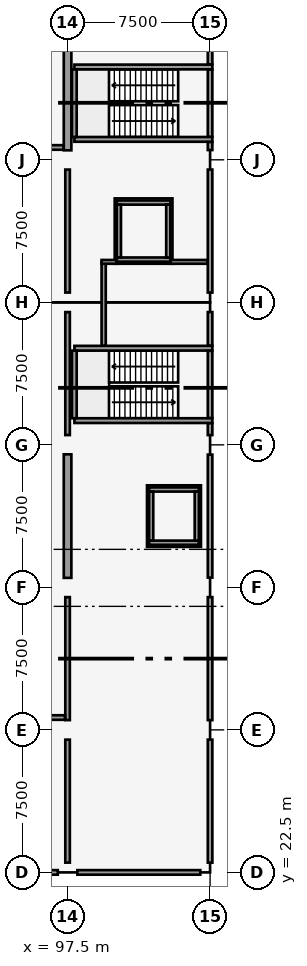
"""IFC4 building model, lengths in metres.
Left out: names, types, materials, properties, quantities, classifications, styles, units other than length and angle.
Written with IfcOpenShell. Run it as: python <this file> out.ifc"""

import sys

from ifc_helpers import new_model, si_unit, direction, frame, frame_2d, origin, origin_2d, place, context, subcontext, project, spatial, rectangle, extrude, element, fill, save


model = new_model("IFC4")
c1 = context("Model", 3, precision=1e-05, world=origin(), true_north=direction((0.0, 1.0)))
c2 = subcontext(c1, "Body", "Model", "MODEL_VIEW")
j1 = project(units=[si_unit("LENGTHUNIT", "METRE"), si_unit("PLANEANGLEUNIT", "RADIAN")], contexts=[c1])
p1 = place(None, origin())
s1 = spatial("IfcSite", under=j1, at=p1, CompositionType="ELEMENT")
p2 = place(p1, origin())
s2 = spatial("IfcBuilding", under=s1, at=p2, CompositionType="ELEMENT")
p3 = place(p2, frame((0.0, 0.0, -4.8)))
s3 = spatial("IfcBuildingStorey", under=s2, at=p3, CompositionType="ELEMENT", Elevation=-4.8)
for number, where, z_axis, x_axis in (
    (1, (97.5, 22.5, 0.0), (0.0, 0.0, 1.0), (1.0, 0.0, 0.0)),
    (2, (97.5, 30.0, 0.0), (0.0, 0.0, 1.0), (1.0, 0.0, 0.0)),
    (3, (97.5, 37.5, 0.0), (0.0, 0.0, 1.0), (1.0, 0.0, 0.0)),
    (4, (97.5, 45.0, 0.0), (0.0, 0.0, 1.0), (1.0, 0.0, 0.0)),
    (5, (97.5, 52.5, 0.0), (0.0, 0.0, 1.0), (1.0, 0.0, 0.0)),
    (6, (97.5, 60.0, 0.0), (0.0, 0.0, 1.0), (1.0, 0.0, 0.0)),
    (7, (105.0, 22.5, 0.0), (0.0, 0.0, 1.0), (1.0, 0.0, 0.0)),
    (8, (105.0, 30.0, 0.0), (0.0, 0.0, 1.0), (1.0, 0.0, 0.0)),
    (9, (105.0, 37.5, 0.0), (0.0, 0.0, 1.0), (1.0, 0.0, 0.0)),
    (10, (105.0, 45.0, 0.0), (0.0, 0.0, 1.0), (1.0, 0.0, 0.0)),
    (11, (105.0, 52.5, 0.0), (0.0, 0.0, 1.0), (1.0, 0.0, 0.0)),
    (12, (105.0, 60.0, 0.0), (0.0, 0.0, 1.0), (1.0, 0.0, 0.0)),
):
    element("IfcColumn", number, at=place(p3, frame(where, z_axis=z_axis, x_axis=x_axis)), inside=s3, PredefinedType="COLUMN", context=c2, shape_type="SweptSolid", body=[
        extrude(rectangle(XDim=1.0, YDim=1.0, at=origin_2d()), origin(), (0.0, 0.0, 1.0), 4.8),
    ])
for number, where, z_axis, x_axis in (
    (13, (97.5, 38.0, 0.0), (0.0, 0.0, 1.0), (0.0, 1.0, 0.0)),
    (14, (97.5, 60.5, 0.0), (0.0, 0.0, 1.0), (0.0, 1.0, 0.0)),
):
    element("IfcWall", number, at=place(p3, frame(where, z_axis=z_axis, x_axis=x_axis)), inside=s3, PredefinedType="SHEAR", context=c2, shape_type="SweptSolid", body=[
        extrude(rectangle(XDim=6.5, YDim=0.4, at=frame_2d((3.25, 0.0))), origin(), (0.0, 0.0, 1.0), 3.55),
    ])
p4 = place(p3, frame((97.86, 46.275, 0.0), z_axis=(0.0, 0.0, 1.0), x_axis=(1.0, 0.0, 0.0)))
e15 = element("IfcWall", 15, at=p4, inside=s3, PredefinedType="SOLIDWALL", context=c2, shape_type="SweptSolid", body=[
    extrude(rectangle(XDim=7.26, YDim=0.25, at=frame_2d((3.63, 0.0))), origin(), (0.0, 0.0, 1.0), 4.5),
])
p5 = place(p4, frame((5.54, 0.0, 0.0)))
e16 = element("IfcOpeningElement", 16, at=p5, cuts=e15, PredefinedType="OPENING", context=c2, shape_type="SweptSolid", body=[
    extrude(rectangle(XDim=1.1, YDim=2.15, at=frame_2d((0.55, 1.075))), frame((0.0, 0.135, 0.0), z_axis=(0.0, -1.0, 0.0), x_axis=(1.0, 0.0, 0.0)), (0.0, 0.0, 1.0), 0.27),
])
p6 = place(p3, frame((97.86, 50.085, 0.0), z_axis=(0.0, 0.0, 1.0), x_axis=(1.0, 0.0, 0.0)))
e17 = element("IfcWall", 17, at=p6, inside=s3, PredefinedType="SOLIDWALL", context=c2, shape_type="SweptSolid", body=[
    extrude(rectangle(XDim=7.26, YDim=0.25, at=frame_2d((3.63, 0.0))), origin(), (0.0, 0.0, 1.0), 4.5),
])
p7 = place(p6, frame((5.54, 0.0, 0.0)))
e18 = element("IfcOpeningElement", 18, at=p7, cuts=e17, PredefinedType="OPENING", context=c2, shape_type="SweptSolid", body=[
    extrude(rectangle(XDim=1.1, YDim=2.15, at=frame_2d((0.55, 1.075))), frame((0.0, 0.135, 0.0), z_axis=(0.0, -1.0, 0.0), x_axis=(1.0, 0.0, 0.0)), (0.0, 0.0, 1.0), 0.27),
])
p8 = place(p3, frame((97.855, 46.4, 0.0), z_axis=(0.0, 0.0, 1.0), x_axis=(0.0, 1.0, 0.0)))
e19 = element("IfcWall", 19, at=p8, inside=s3, PredefinedType="SOLIDWALL", context=c2, shape_type="SweptSolid", body=[
    extrude(rectangle(XDim=3.56, YDim=0.25, at=frame_2d((1.78, 0.0))), origin(), (0.0, 0.0, 1.0), 4.5),
])
p9 = place(p3, frame((97.86, 61.075, 0.0), z_axis=(0.0, 0.0, 1.0), x_axis=(1.0, 0.0, 0.0)))
e20 = element("IfcWall", 20, at=p9, inside=s3, PredefinedType="SOLIDWALL", context=c2, shape_type="SweptSolid", body=[
    extrude(rectangle(XDim=7.26, YDim=0.25, at=frame_2d((3.63, 0.0))), origin(), (0.0, 0.0, 1.0), 4.5),
])
p10 = place(p9, frame((5.54, 0.0, 0.0)))
e21 = element("IfcOpeningElement", 21, at=p10, cuts=e20, PredefinedType="OPENING", context=c2, shape_type="SweptSolid", body=[
    extrude(rectangle(XDim=1.1, YDim=2.15, at=frame_2d((0.55, 1.075))), frame((0.0, 0.135, 0.0), z_axis=(0.0, -1.0, 0.0), x_axis=(1.0, 0.0, 0.0)), (0.0, 0.0, 1.0), 0.27),
])
p11 = place(p3, frame((97.86, 64.885, 0.0), z_axis=(0.0, 0.0, 1.0), x_axis=(1.0, 0.0, 0.0)))
e22 = element("IfcWall", 22, at=p11, inside=s3, PredefinedType="SOLIDWALL", context=c2, shape_type="SweptSolid", body=[
    extrude(rectangle(XDim=7.26, YDim=0.25, at=frame_2d((3.63, 0.0))), origin(), (0.0, 0.0, 1.0), 4.5),
])
p12 = place(p11, frame((5.54, 0.0, 0.0)))
e23 = element("IfcOpeningElement", 23, at=p12, cuts=e22, PredefinedType="OPENING", context=c2, shape_type="SweptSolid", body=[
    extrude(rectangle(XDim=1.1, YDim=2.15, at=frame_2d((0.55, 1.075))), frame((0.0, 0.135, 0.0), z_axis=(0.0, -1.0, 0.0), x_axis=(1.0, 0.0, 0.0)), (0.0, 0.0, 1.0), 0.27),
])
p13 = place(p3, frame((97.855, 61.2, 0.0), z_axis=(0.0, 0.0, 1.0), x_axis=(0.0, 1.0, 0.0)))
e24 = element("IfcWall", 24, at=p13, inside=s3, PredefinedType="SOLIDWALL", context=c2, shape_type="SweptSolid", body=[
    extrude(rectangle(XDim=3.56, YDim=0.25, at=frame_2d((1.78, 0.0))), origin(), (0.0, 0.0, 1.0), 4.5),
])
for number, where, z_axis, x_axis in (
    (25, (101.79, 39.85, 0.0), (0.0, 0.0, 1.0), (1.0, 0.0, 0.0)),
    (26, (101.79, 42.65, 0.0), (0.0, 0.0, 1.0), (1.0, 0.0, 0.0)),
):
    element("IfcWall", number, at=place(p3, frame(where, z_axis=z_axis, x_axis=x_axis)), inside=s3, PredefinedType="SOLIDWALL", context=c2, shape_type="SweptSolid", body=[
        extrude(rectangle(XDim=2.62, YDim=0.22, at=frame_2d((1.31, 0.0))), origin(), (0.0, 0.0, 1.0), 4.5),
    ])
p14 = place(p3, frame((101.9, 39.96, 0.0), z_axis=(0.0, 0.0, 1.0), x_axis=(0.0, 1.0, 0.0)))
e27 = element("IfcWall", 27, at=p14, inside=s3, PredefinedType="SOLIDWALL", context=c2, shape_type="SweptSolid", body=[
    extrude(rectangle(XDim=2.58, YDim=0.22, at=frame_2d((1.29, 0.0))), origin(), (0.0, 0.0, 1.0), 4.5),
])
p15 = place(p14, frame((0.79, 0.0, 0.0)))
e28 = element("IfcOpeningElement", 28, at=p15, cuts=e27, PredefinedType="OPENING", context=c2, shape_type="SweptSolid", body=[
    extrude(rectangle(XDim=1.0, YDim=2.15, at=frame_2d((0.5, 1.075))), frame((0.0, 0.12, 0.0), z_axis=(0.0, -1.0, 0.0), x_axis=(1.0, 0.0, 0.0)), (0.0, 0.0, 1.0), 0.24),
])
p16 = place(p3, frame((104.3, 39.96, 0.0), z_axis=(0.0, 0.0, 1.0), x_axis=(0.0, 1.0, 0.0)))
e29 = element("IfcWall", 29, at=p16, inside=s3, PredefinedType="SOLIDWALL", context=c2, shape_type="SweptSolid", body=[
    extrude(rectangle(XDim=2.58, YDim=0.22, at=frame_2d((1.29, 0.0))), origin(), (0.0, 0.0, 1.0), 4.5),
])
p17 = place(p3, frame((100.09, 54.75, 0.0), z_axis=(0.0, 0.0, 1.0), x_axis=(1.0, 0.0, 0.0)))
e30 = element("IfcWall", 30, at=p17, inside=s3, PredefinedType="SOLIDWALL", context=c2, shape_type="SweptSolid", body=[
    extrude(rectangle(XDim=2.82, YDim=0.22, at=frame_2d((1.41, 0.0))), origin(), (0.0, 0.0, 1.0), 4.5),
])
p18 = place(p17, frame((0.86, 0.0, 0.0)))
e31 = element("IfcOpeningElement", 31, at=p18, cuts=e30, PredefinedType="OPENING", context=c2, shape_type="SweptSolid", body=[
    extrude(rectangle(XDim=1.1, YDim=2.15, at=frame_2d((0.55, 1.075))), frame((0.0, 0.12, 0.0), z_axis=(0.0, -1.0, 0.0), x_axis=(1.0, 0.0, 0.0)), (0.0, 0.0, 1.0), 0.24),
])
p19 = place(p3, frame((100.09, 57.75, 0.0), z_axis=(0.0, 0.0, 1.0), x_axis=(1.0, 0.0, 0.0)))
e32 = element("IfcWall", 32, at=p19, inside=s3, PredefinedType="SOLIDWALL", context=c2, shape_type="SweptSolid", body=[
    extrude(rectangle(XDim=2.82, YDim=0.22, at=frame_2d((1.41, 0.0))), origin(), (0.0, 0.0, 1.0), 4.5),
])
for number, where, z_axis, x_axis in (
    (33, (100.2, 54.86, 0.0), (0.0, 0.0, 1.0), (0.0, 1.0, 0.0)),
    (34, (102.8, 54.86, 0.0), (0.0, 0.0, 1.0), (0.0, 1.0, 0.0)),
):
    element("IfcWall", number, at=place(p3, frame(where, z_axis=z_axis, x_axis=x_axis)), inside=s3, PredefinedType="SOLIDWALL", context=c2, shape_type="SweptSolid", body=[
        extrude(rectangle(XDim=2.78, YDim=0.22, at=frame_2d((1.39, 0.0))), origin(), (0.0, 0.0, 1.0), 4.5),
    ])
p20 = place(p3, frame((99.4, 50.22, 0.0), z_axis=(0.0, 0.0, 1.0), x_axis=(0.0, 1.0, 0.0)))
e35 = element("IfcWall", 35, at=p20, inside=s3, PredefinedType="SOLIDWALL", context=c2, shape_type="SweptSolid", body=[
    extrude(rectangle(XDim=4.41, YDim=0.22, at=frame_2d((2.205, 0.0))), origin(), (0.0, 0.0, 1.0), 4.5),
])
p21 = place(p20, frame((0.45, 0.0, 0.0)))
e36 = element("IfcOpeningElement", 36, at=p21, cuts=e35, PredefinedType="OPENING", context=c2, shape_type="SweptSolid", body=[
    extrude(rectangle(XDim=1.1, YDim=2.15, at=frame_2d((0.55, 1.075))), frame((0.0, 0.12, 0.0), z_axis=(0.0, -1.0, 0.0), x_axis=(1.0, 0.0, 0.0)), (0.0, 0.0, 1.0), 0.24),
])
p22 = place(p3, frame((99.29, 54.63, 0.0), z_axis=(0.0, 0.0, 1.0), x_axis=(1.0, 0.0, 0.0)))
e37 = element("IfcWall", 37, at=p22, inside=s3, PredefinedType="PARTITIONING", context=c2, shape_type="SweptSolid", body=[
    extrude(rectangle(XDim=0.785, YDim=0.2, at=frame_2d((0.393, 0.0))), origin(), (0.0, 0.0, 1.0), 4.48),
])
p23 = place(p3, frame((102.925, 54.63, 0.0), z_axis=(0.0, 0.0, 1.0), x_axis=(1.0, 0.0, 0.0)))
e38 = element("IfcWall", 38, at=p23, inside=s3, PredefinedType="PARTITIONING", context=c2, shape_type="SweptSolid", body=[
    extrude(rectangle(XDim=1.935, YDim=0.2, at=frame_2d((0.968, 0.0))), origin(), (0.0, 0.0, 1.0), 4.48),
])
p24 = place(p3, frame((90.464, 22.5, 0.0), z_axis=(0.0, 0.0, 1.0), x_axis=(1.0, 0.0, 0.0)))
e39 = element("IfcWall", 39, at=p24, inside=s3, PredefinedType="PARTITIONING", context=c2, shape_type="SweptSolid", body=[
    extrude(rectangle(XDim=6.522, YDim=0.24, at=frame_2d((3.261, 0.0))), origin(), (0.0, 0.0, 1.0), 3.82),
])
p25 = place(p3, frame((98.014, 22.5, 0.0), z_axis=(0.0, 0.0, 1.0), x_axis=(1.0, 0.0, 0.0)))
e40 = element("IfcWall", 40, at=p25, inside=s3, PredefinedType="PARTITIONING", context=c2, shape_type="SweptSolid", body=[
    extrude(rectangle(XDim=6.472, YDim=0.24, at=frame_2d((3.236, 0.0))), origin(), (0.0, 0.0, 1.0), 3.82),
])
for number, where, z_axis, x_axis in (
    (41, (105.0, 23.014, 0.0), (0.0, 0.0, 1.0), (0.0, 1.0, 0.0)),
    (42, (105.0, 30.514, 0.0), (0.0, 0.0, 1.0), (0.0, 1.0, 0.0)),
    (43, (105.0, 38.014, 0.0), (0.0, 0.0, 1.0), (0.0, 1.0, 0.0)),
):
    element("IfcWall", number, at=place(p3, frame(where, z_axis=z_axis, x_axis=x_axis)), inside=s3, PredefinedType="PARTITIONING", context=c2, shape_type="SweptSolid", body=[
        extrude(rectangle(XDim=6.472, YDim=0.24, at=frame_2d((3.236, 0.0))), origin(), (0.0, 0.0, 1.0), 3.52),
    ])
p26 = place(p3, frame((105.0, 45.514, 0.0), z_axis=(0.0, 0.0, 1.0), x_axis=(0.0, 1.0, 0.0)))
e44 = element("IfcWall", 44, at=p26, inside=s3, PredefinedType="PARTITIONING", context=c2, shape_type="SweptSolid", body=[
    extrude(rectangle(XDim=0.622, YDim=0.24, at=frame_2d((0.311, 0.0))), origin(), (0.0, 0.0, 1.0), 3.52),
])
p27 = place(p3, frame((105.0, 46.414, 0.0), z_axis=(0.0, 0.0, 1.0), x_axis=(0.0, 1.0, 0.0)))
e45 = element("IfcWall", 45, at=p27, inside=s3, PredefinedType="PARTITIONING", context=c2, shape_type="SweptSolid", body=[
    extrude(rectangle(XDim=3.532, YDim=0.24, at=frame_2d((1.766, 0.0))), origin(), (0.0, 0.0, 1.0), 3.87),
])
p28 = place(p3, frame((105.0, 50.224, 0.0), z_axis=(0.0, 0.0, 1.0), x_axis=(0.0, 1.0, 0.0)))
e46 = element("IfcWall", 46, at=p28, inside=s3, PredefinedType="PARTITIONING", context=c2, shape_type="SweptSolid", body=[
    extrude(rectangle(XDim=1.762, YDim=0.24, at=frame_2d((0.881, 0.0))), origin(), (0.0, 0.0, 1.0), 3.52),
])
p29 = place(p3, frame((105.0, 53.014, 0.0), z_axis=(0.0, 0.0, 1.0), x_axis=(0.0, 1.0, 0.0)))
e47 = element("IfcWall", 47, at=p29, inside=s3, PredefinedType="PARTITIONING", context=c2, shape_type="SweptSolid", body=[
    extrude(rectangle(XDim=6.472, YDim=0.24, at=frame_2d((3.236, 0.0))), origin(), (0.0, 0.0, 1.0), 3.52),
])
p30 = place(p3, frame((105.0, 60.514, 0.0), z_axis=(0.0, 0.0, 1.0), x_axis=(0.0, 1.0, 0.0)))
e48 = element("IfcWall", 48, at=p30, inside=s3, PredefinedType="PARTITIONING", context=c2, shape_type="SweptSolid", body=[
    extrude(rectangle(XDim=0.422, YDim=0.24, at=frame_2d((0.211, 0.0))), origin(), (0.0, 0.0, 1.0), 3.52),
])
p31 = place(p3, frame((105.0, 61.214, 0.0), z_axis=(0.0, 0.0, 1.0), x_axis=(0.0, 1.0, 0.0)))
e49 = element("IfcWall", 49, at=p31, inside=s3, PredefinedType="PARTITIONING", context=c2, shape_type="SweptSolid", body=[
    extrude(rectangle(XDim=3.532, YDim=0.24, at=frame_2d((1.766, 0.0))), origin(), (0.0, 0.0, 1.0), 3.87),
])
p32 = place(p3, frame((105.0, 65.024, 0.0), z_axis=(0.0, 0.0, 1.0), x_axis=(0.0, 1.0, 0.0)))
e50 = element("IfcWall", 50, at=p32, inside=s3, PredefinedType="PARTITIONING", context=c2, shape_type="SweptSolid", body=[
    extrude(rectangle(XDim=1.962, YDim=0.24, at=frame_2d((0.981, 0.0))), origin(), (0.0, 0.0, 1.0), 3.52),
])
p33 = place(p3, frame((97.5, 23.014, 0.0), z_axis=(0.0, 0.0, 1.0), x_axis=(0.0, 1.0, 0.0)))
e51 = element("IfcWall", 51, at=p33, inside=s3, PredefinedType="PARTITIONING", context=c2, shape_type="SweptSolid", body=[
    extrude(rectangle(XDim=6.472, YDim=0.24, at=frame_2d((3.236, 0.0))), origin(), (0.0, 0.0, 1.0), 3.52),
])
p34 = place(p33, frame((2.436, 0.0, 0.0)))
e52 = element("IfcOpeningElement", 52, at=p34, cuts=e51, PredefinedType="OPENING", context=c2, shape_type="SweptSolid", body=[
    extrude(rectangle(XDim=1.6, YDim=2.15, at=frame_2d((0.8, 1.075))), frame((0.0, 0.13, 0.0), z_axis=(0.0, -1.0, 0.0), x_axis=(1.0, 0.0, 0.0)), (0.0, 0.0, 1.0), 0.26),
])
p35 = place(p3, frame((97.5, 30.514, 0.0), z_axis=(0.0, 0.0, 1.0), x_axis=(0.0, 1.0, 0.0)))
e53 = element("IfcWall", 53, at=p35, inside=s3, PredefinedType="PARTITIONING", context=c2, shape_type="SweptSolid", body=[
    extrude(rectangle(XDim=6.472, YDim=0.24, at=frame_2d((3.236, 0.0))), origin(), (0.0, 0.0, 1.0), 3.52),
])
p36 = place(p35, frame((2.436, 0.0, 0.0)))
e54 = element("IfcOpeningElement", 54, at=p36, cuts=e53, PredefinedType="OPENING", context=c2, shape_type="SweptSolid", body=[
    extrude(rectangle(XDim=1.6, YDim=2.15, at=frame_2d((0.8, 1.075))), frame((0.0, 0.13, 0.0), z_axis=(0.0, -1.0, 0.0), x_axis=(1.0, 0.0, 0.0)), (0.0, 0.0, 1.0), 0.26),
])
p37 = place(p3, frame((97.5, 45.514, 0.0), z_axis=(0.0, 0.0, 1.0), x_axis=(0.0, 1.0, 0.0)))
e55 = element("IfcWall", 55, at=p37, inside=s3, PredefinedType="PARTITIONING", context=c2, shape_type="SweptSolid", body=[
    extrude(rectangle(XDim=6.472, YDim=0.24, at=frame_2d((3.236, 0.0))), origin(), (0.0, 0.0, 1.0), 3.52),
])
p38 = place(p3, frame((97.5, 53.014, 0.0), z_axis=(0.0, 0.0, 1.0), x_axis=(0.0, 1.0, 0.0)))
e56 = element("IfcWall", 56, at=p38, inside=s3, PredefinedType="PARTITIONING", context=c2, shape_type="SweptSolid", body=[
    extrude(rectangle(XDim=6.472, YDim=0.24, at=frame_2d((3.236, 0.0))), origin(), (0.0, 0.0, 1.0), 3.52),
])
p39 = place(p38, frame((2.436, 0.0, 0.0)))
e57 = element("IfcOpeningElement", 57, at=p39, cuts=e56, PredefinedType="OPENING", context=c2, shape_type="SweptSolid", body=[
    extrude(rectangle(XDim=1.6, YDim=2.15, at=frame_2d((0.8, 1.075))), frame((0.0, 0.13, 0.0), z_axis=(0.0, -1.0, 0.0), x_axis=(1.0, 0.0, 0.0)), (0.0, 0.0, 1.0), 0.26),
])
p40 = place(p3, frame((60.134, 30.65, 0.0), z_axis=(0.0, 0.0, 1.0), x_axis=(1.0, 0.0, 0.0)))
e58 = element("IfcWall", 58, at=p40, inside=s3, PredefinedType="PARTITIONING", context=c2, shape_type="SweptSolid", body=[
    extrude(rectangle(XDim=37.232, YDim=0.24, at=frame_2d((18.616, 0.0))), origin(), (0.0, 0.0, 1.0), 3.42),
])
p41 = place(p3, frame((60.214, 60.65, 0.0), z_axis=(0.0, 0.0, 1.0), x_axis=(1.0, 0.0, 0.0)))
e59 = element("IfcWall", 59, at=p41, inside=s3, PredefinedType="PARTITIONING", context=c2, shape_type="SweptSolid", body=[
    extrude(rectangle(XDim=37.072, YDim=0.24, at=frame_2d((18.536, 0.0))), origin(), (0.0, 0.0, 1.0), 2.67),
])
p42 = place(p5, origin())
e60 = element("IfcDoor", 60, at=p42, inside=s3, OperationType="SINGLE_SWING_LEFT", PredefinedType="DOOR", context=c2, shape_type="SweptSolid", body=[
    extrude(rectangle(XDim=1.1, YDim=2.15, at=frame_2d((0.55, 1.075))), frame((0.0, 0.025, 0.0), z_axis=(0.0, -1.0, 0.0), x_axis=(1.0, 0.0, 0.0)), (0.0, 0.0, 1.0), 0.05),
])
fill(e16, e60)
p43 = place(p7, frame((1.1, 0.0, 0.0), z_axis=(0.0, 0.0, 1.0), x_axis=(-1.0, 0.0, 0.0)))
e61 = element("IfcDoor", 61, at=p43, inside=s3, OperationType="SINGLE_SWING_RIGHT", PredefinedType="DOOR", context=c2, shape_type="SweptSolid", body=[
    extrude(rectangle(XDim=1.1, YDim=2.15, at=frame_2d((0.55, 1.075))), frame((0.0, 0.025, 0.0), z_axis=(0.0, -1.0, 0.0), x_axis=(1.0, 0.0, 0.0)), (0.0, 0.0, 1.0), 0.05),
])
fill(e18, e61)
p44 = place(p10, origin())
e62 = element("IfcDoor", 62, at=p44, inside=s3, OperationType="SINGLE_SWING_LEFT", PredefinedType="DOOR", context=c2, shape_type="SweptSolid", body=[
    extrude(rectangle(XDim=1.1, YDim=2.15, at=frame_2d((0.55, 1.075))), frame((0.0, 0.025, 0.0), z_axis=(0.0, -1.0, 0.0), x_axis=(1.0, 0.0, 0.0)), (0.0, 0.0, 1.0), 0.05),
])
fill(e21, e62)
p45 = place(p12, frame((1.1, 0.0, 0.0), z_axis=(0.0, 0.0, 1.0), x_axis=(-1.0, 0.0, 0.0)))
e63 = element("IfcDoor", 63, at=p45, inside=s3, OperationType="SINGLE_SWING_RIGHT", PredefinedType="DOOR", context=c2, shape_type="SweptSolid", body=[
    extrude(rectangle(XDim=1.1, YDim=2.15, at=frame_2d((0.55, 1.075))), frame((0.0, 0.025, 0.0), z_axis=(0.0, -1.0, 0.0), x_axis=(1.0, 0.0, 0.0)), (0.0, 0.0, 1.0), 0.05),
])
fill(e23, e63)
p46 = place(p15, origin())
e64 = element("IfcDoor", 64, at=p46, inside=s3, OperationType="SLIDING_TO_LEFT", PredefinedType="DOOR", context=c2, shape_type="SweptSolid", body=[
    extrude(rectangle(XDim=1.0, YDim=2.15, at=frame_2d((0.5, 1.075))), frame((0.0, 0.025, 0.0), z_axis=(0.0, -1.0, 0.0), x_axis=(1.0, 0.0, 0.0)), (0.0, 0.0, 1.0), 0.05),
])
fill(e28, e64)
p47 = place(p18, origin())
e65 = element("IfcDoor", 65, at=p47, inside=s3, OperationType="SLIDING_TO_LEFT", PredefinedType="DOOR", context=c2, shape_type="SweptSolid", body=[
    extrude(rectangle(XDim=1.1, YDim=2.15, at=frame_2d((0.55, 1.075))), frame((0.0, 0.025, 0.0), z_axis=(0.0, -1.0, 0.0), x_axis=(1.0, 0.0, 0.0)), (0.0, 0.0, 1.0), 0.05),
])
fill(e31, e65)
p48 = place(p21, origin())
e66 = element("IfcDoor", 66, at=p48, inside=s3, OperationType="SINGLE_SWING_RIGHT", PredefinedType="DOOR", context=c2, shape_type="SweptSolid", body=[
    extrude(rectangle(XDim=1.1, YDim=2.15, at=frame_2d((0.55, 1.075))), frame((0.0, 0.025, 0.0), z_axis=(0.0, -1.0, 0.0), x_axis=(1.0, 0.0, 0.0)), (0.0, 0.0, 1.0), 0.05),
])
fill(e36, e66)
p49 = place(p34, origin())
e67 = element("IfcDoor", 67, at=p49, inside=s3, OperationType="SINGLE_SWING_RIGHT", PredefinedType="DOOR", context=c2, shape_type="SweptSolid", body=[
    extrude(rectangle(XDim=1.6, YDim=2.15, at=frame_2d((0.8, 1.075))), frame((0.0, 0.025, 0.0), z_axis=(0.0, -1.0, 0.0), x_axis=(1.0, 0.0, 0.0)), (0.0, 0.0, 1.0), 0.05),
])
fill(e52, e67)
p50 = place(p36, origin())
e68 = element("IfcDoor", 68, at=p50, inside=s3, OperationType="SINGLE_SWING_LEFT", PredefinedType="DOOR", context=c2, shape_type="SweptSolid", body=[
    extrude(rectangle(XDim=1.6, YDim=2.15, at=frame_2d((0.8, 1.075))), frame((0.0, 0.025, 0.0), z_axis=(0.0, -1.0, 0.0), x_axis=(1.0, 0.0, 0.0)), (0.0, 0.0, 1.0), 0.05),
])
fill(e54, e68)
p51 = place(p39, origin())
e69 = element("IfcDoor", 69, at=p51, inside=s3, OperationType="SINGLE_SWING_RIGHT", PredefinedType="DOOR", context=c2, shape_type="SweptSolid", body=[
    extrude(rectangle(XDim=1.6, YDim=2.15, at=frame_2d((0.8, 1.075))), frame((0.0, 0.025, 0.0), z_axis=(0.0, -1.0, 0.0), x_axis=(1.0, 0.0, 0.0)), (0.0, 0.0, 1.0), 0.05),
])
fill(e57, e69)
save(model, sys.argv[1])
